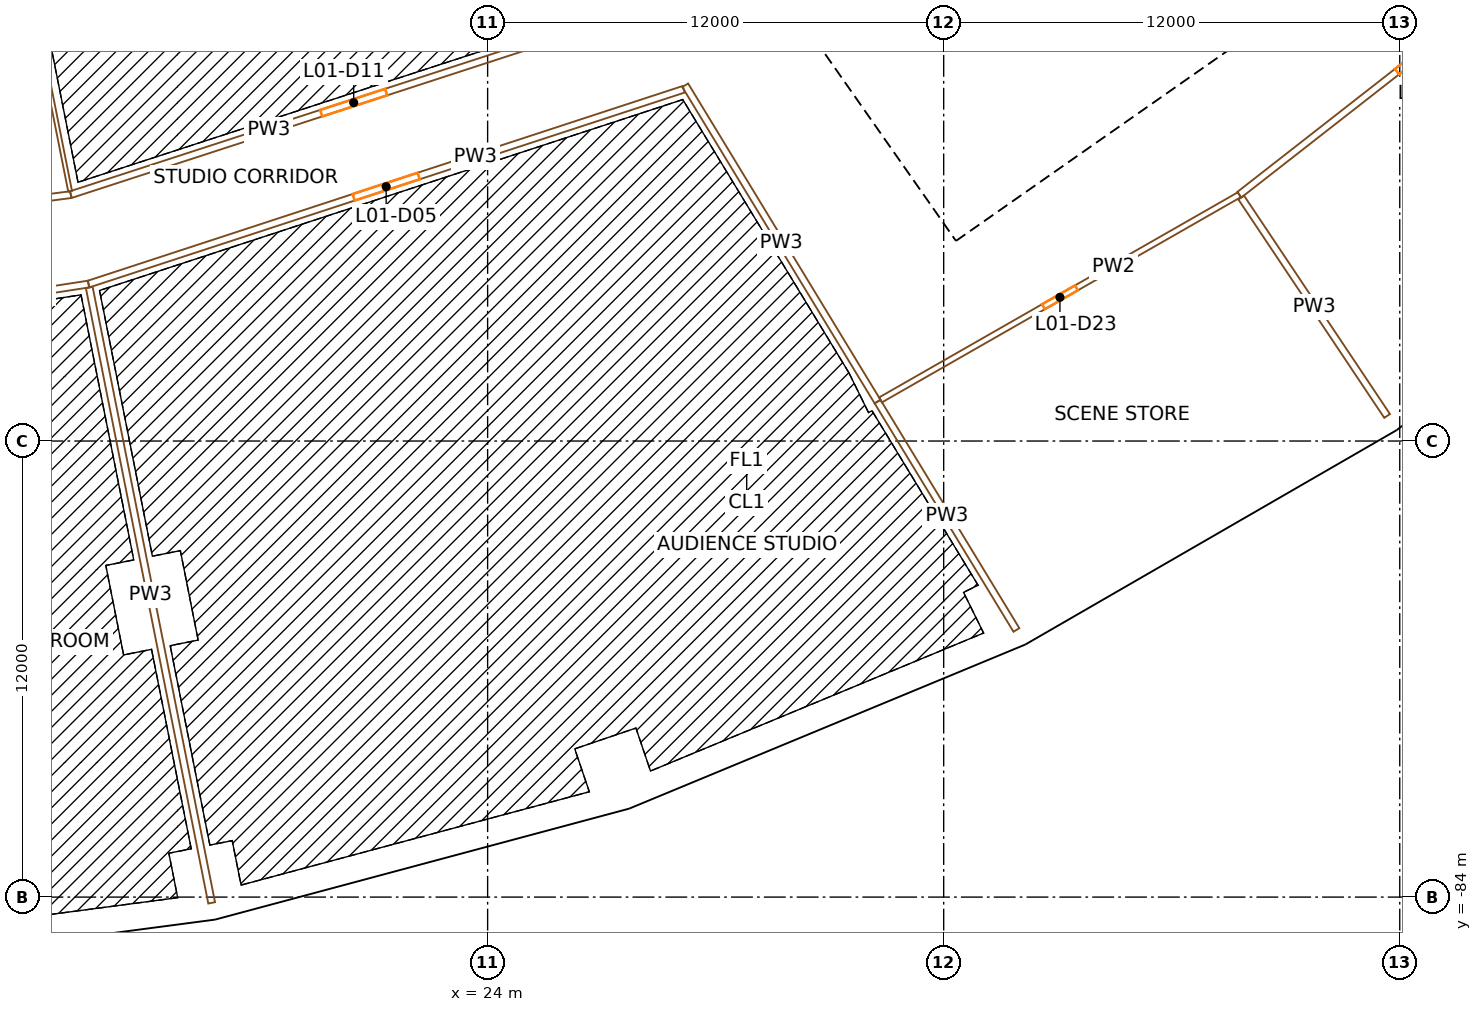
"""IFC4 building model, lengths in metres.
Left out: names, types, materials, properties, quantities, classifications, styles, units other than length and angle.
Written with IfcOpenShell. Run it as: python <this file> out.ifc"""

import sys

from ifc_helpers import new_model, si_unit, direction, frame, frame_2d, origin, origin_2d, place, context, subcontext, project, spatial, rectangle, extrude, element, fill, save


model = new_model("IFC4")
c1 = context("Model", 3, precision=1e-05, world=origin(), true_north=direction((0.0, 1.0)))
c2 = subcontext(c1, "Body", "Model", "MODEL_VIEW")
j1 = project(units=[si_unit("LENGTHUNIT", "METRE"), si_unit("PLANEANGLEUNIT", "RADIAN")], contexts=[c1])
p1 = place(None, origin())
s1 = spatial("IfcSite", under=j1, at=p1, CompositionType="ELEMENT")
p2 = place(p1, origin())
s2 = spatial("IfcBuilding", under=s1, at=p2, CompositionType="ELEMENT")
p3 = place(p2, frame((0.0, 0.0, 9.0)))
s3 = spatial("IfcBuildingStorey", under=s2, at=p3, CompositionType="ELEMENT", Elevation=9.0)
p4 = place(p3, frame((15.168, -76.256, 0.0), z_axis=(0.0, 0.0, 1.0), x_axis=(0.980785280403, 0.195090322016, 0.0)))
e1 = element("IfcColumn", 1, at=p4, inside=s3, PredefinedType="COLUMN", context=c2, shape_type="SweptSolid", body=[
    extrude(rectangle(XDim=1.4, YDim=1.8, at=origin_2d()), origin(), (0.0, 0.0, 1.0), 9.0),
])
p5 = place(p3, frame((16.631, -83.612, 0.0), z_axis=(0.0, 0.0, 1.0), x_axis=(0.980785280403, 0.195090322016, 0.0)))
e2 = element("IfcColumn", 2, at=p5, inside=s3, PredefinedType="COLUMN", context=c2, shape_type="SweptSolid", body=[
    extrude(rectangle(XDim=1.1, YDim=1.3, at=origin_2d()), origin(), (0.0, 0.0, 1.0), 9.0),
])
p6 = place(p3, frame((24.992, -73.624, 0.0), z_axis=(0.0, 0.0, 1.0), x_axis=(0.946930129495, 0.321439465303, 0.0)))
e3 = element("IfcColumn", 3, at=p6, inside=s3, PredefinedType="COLUMN", context=c2, shape_type="SweptSolid", body=[
    extrude(rectangle(XDim=1.4, YDim=1.8, at=origin_2d()), origin(), (0.0, 0.0, 1.0), 9.0),
])
p7 = place(p3, frame((27.403, -80.726, 0.0), z_axis=(0.0, 0.0, 1.0), x_axis=(0.946930129495, 0.321439465303, 0.0)))
e4 = element("IfcColumn", 4, at=p7, inside=s3, PredefinedType="COLUMN", context=c2, shape_type="SweptSolid", body=[
    extrude(rectangle(XDim=1.1, YDim=1.3, at=origin_2d()), origin(), (0.0, 0.0, 1.0), 9.0),
])
p8 = place(p3, frame((34.388, -69.732, 0.0), z_axis=(0.0, 0.0, 1.0), x_axis=(0.896872741533, 0.442288690219, 0.0)))
e5 = element("IfcColumn", 5, at=p8, inside=s3, PredefinedType="COLUMN", context=c2, shape_type="SweptSolid", body=[
    extrude(rectangle(XDim=1.4, YDim=1.8, at=origin_2d()), origin(), (0.0, 0.0, 1.0), 9.0),
])
p9 = place(p3, frame((37.705, -76.458, 0.0), z_axis=(0.0, 0.0, 1.0), x_axis=(0.896872741533, 0.442288690219, 0.0)))
e6 = element("IfcColumn", 6, at=p9, inside=s3, PredefinedType="COLUMN", context=c2, shape_type="SweptSolid", body=[
    extrude(rectangle(XDim=1.1, YDim=1.3, at=origin_2d()), origin(), (0.0, 0.0, 1.0), 9.0),
])
p10 = place(p3, frame((43.196, -64.647, 0.0), z_axis=(0.0, 0.0, 1.0), x_axis=(0.831469612303, 0.55557023302, 0.0)))
e7 = element("IfcColumn", 7, at=p10, inside=s3, PredefinedType="COLUMN", context=c2, shape_type="SweptSolid", body=[
    extrude(rectangle(XDim=1.4, YDim=1.8, at=origin_2d()), origin(), (0.0, 0.0, 1.0), 9.0),
])
p11 = place(p3, frame((47.362, -70.883, 0.0), z_axis=(0.0, 0.0, 1.0), x_axis=(0.831469612303, 0.55557023302, 0.0)))
e8 = element("IfcColumn", 8, at=p11, inside=s3, PredefinedType="COLUMN", context=c2, shape_type="SweptSolid", body=[
    extrude(rectangle(XDim=1.1, YDim=1.3, at=origin_2d()), origin(), (0.0, 0.0, 1.0), 9.0),
])
p12 = place(p3, frame((36.717, -66.337, 0.0), z_axis=(0.0, 0.0, 1.0), x_axis=(-0.573577477574, 0.819151315216, 0.0)))
e9 = element("IfcWall", 9, at=p12, inside=s3, PredefinedType="SHEAR", context=c2, shape_type="SweptSolid", body=[
    extrude(rectangle(XDim=14.8, YDim=0.9, at=frame_2d((7.4, 0.0))), origin(), (0.0, 0.0, 1.0), 8.6),
])
p13 = place(p12, frame((6.2, 0.0, 0.0)))
e10 = element("IfcOpeningElement", 10, at=p13, cuts=e9, PredefinedType="OPENING", context=c2, shape_type="SweptSolid", body=[
    extrude(rectangle(XDim=2.4, YDim=2.1, at=frame_2d((1.2, 1.05))), frame((0.0, 0.46, 0.0), z_axis=(0.0, -1.0, 0.0), x_axis=(1.0, 0.0, 0.0)), (0.0, 0.0, 1.0), 0.92),
])
p14 = place(p3, frame((36.827, -65.71, 0.0), z_axis=(0.0, 0.0, 1.0), x_axis=(0.819153391756, 0.573574511963, 0.0)))
e11 = element("IfcWall", 11, at=p14, inside=s3, PredefinedType="SHEAR", context=c2, shape_type="SweptSolid", body=[
    extrude(rectangle(XDim=15.045, YDim=0.9, at=frame_2d((7.523, 0.0))), origin(), (0.0, 0.0, 1.0), 8.6),
])
p15 = place(p14, frame((0.8, 0.0, 0.0)))
e12 = element("IfcOpeningElement", 12, at=p15, cuts=e11, PredefinedType="OPENING", context=c2, shape_type="SweptSolid", body=[
    extrude(rectangle(XDim=1.0, YDim=2.1, at=frame_2d((0.5, 1.05))), frame((0.0, 0.46, 0.0), z_axis=(0.0, -1.0, 0.0), x_axis=(1.0, 0.0, 0.0)), (0.0, 0.0, 1.0), 0.92),
])
p16 = place(p14, frame((3.475, 0.0, 0.0)))
e13 = element("IfcOpeningElement", 13, at=p16, cuts=e11, PredefinedType="OPENING", context=c2, shape_type="SweptSolid", body=[
    extrude(rectangle(XDim=1.0, YDim=2.1, at=frame_2d((0.5, 1.05))), frame((0.0, 0.46, 0.0), z_axis=(0.0, -1.0, 0.0), x_axis=(1.0, 0.0, 0.0)), (0.0, 0.0, 1.0), 0.92),
])
p17 = place(p14, frame((6.175, 0.0, 0.0)))
e14 = element("IfcOpeningElement", 14, at=p17, cuts=e11, PredefinedType="OPENING", context=c2, shape_type="SweptSolid", body=[
    extrude(rectangle(XDim=1.0, YDim=2.1, at=frame_2d((0.5, 1.05))), frame((0.0, 0.46, 0.0), z_axis=(0.0, -1.0, 0.0), x_axis=(1.0, 0.0, 0.0)), (0.0, 0.0, 1.0), 0.92),
])
p18 = place(p14, frame((13.495, 0.0, 0.0)))
e15 = element("IfcOpeningElement", 15, at=p18, cuts=e11, PredefinedType="OPENING", context=c2, shape_type="SweptSolid", body=[
    extrude(rectangle(XDim=1.1, YDim=2.1, at=frame_2d((0.55, 1.05))), frame((0.0, 0.46, 0.0), z_axis=(0.0, -1.0, 0.0), x_axis=(1.0, 0.0, 0.0)), (0.0, 0.0, 1.0), 0.92),
])
p19 = place(p3, frame((35.221, -63.417, 0.0), z_axis=(0.0, 0.0, 1.0), x_axis=(0.819166993208, 0.573555086491, 0.0)))
e16 = element("IfcWall", 16, at=p19, inside=s3, PredefinedType="SOLIDWALL", context=c2, shape_type="SweptSolid", body=[
    extrude(rectangle(XDim=7.95, YDim=0.3, at=frame_2d((3.975, 0.0))), origin(), (0.0, 0.0, 1.0), 8.6),
])
p20 = place(p3, frame((35.512, -60.344, 0.0), z_axis=(0.0, 0.0, 1.0), x_axis=(0.573633636671, -0.819111989218, 0.0)))
e17 = element("IfcWall", 17, at=p20, inside=s3, PredefinedType="PARTITIONING", context=c2, shape_type="SweptSolid", body=[
    extrude(rectangle(XDim=2.2, YDim=0.15, at=frame_2d((1.1, 0.0))), origin(), (0.0, 0.0, 1.0), 8.6),
])
p21 = place(p3, frame((37.478, -62.02, 0.0), z_axis=(0.0, 0.0, 1.0), x_axis=(0.573581496053, -0.819148501424, 0.0)))
e18 = element("IfcWall", 18, at=p21, inside=s3, PredefinedType="PLUMBINGWALL", context=c2, shape_type="SweptSolid", body=[
    extrude(rectangle(XDim=2.2, YDim=0.1, at=frame_2d((1.1, 0.0))), origin(), (0.0, 0.0, 1.0), 8.6),
])
p22 = place(p3, frame((39.649, -60.5, 0.0), z_axis=(0.0, 0.0, 1.0), x_axis=(0.573507030513, -0.819200638399, 0.0)))
e19 = element("IfcWall", 19, at=p22, inside=s3, PredefinedType="PLUMBINGWALL", context=c2, shape_type="SweptSolid", body=[
    extrude(rectangle(XDim=2.2, YDim=0.1, at=frame_2d((1.1, 0.0))), origin(), (0.0, 0.0, 1.0), 8.6),
])
p23 = place(p3, frame((5.685, -85.833, 0.0), z_axis=(0.0, 0.0, 1.0), x_axis=(0.991447502826, 0.130506126829, 0.0)))
e20 = element("IfcWall", 20, at=p23, inside=s3, PredefinedType="SOLIDWALL", context=c2, shape_type="SweptSolid", body=[
    extrude(rectangle(XDim=11.135, YDim=0.45, at=frame_2d((5.567, 0.0))), origin(), (0.0, 0.0, 1.0), 7.7),
])
p24 = place(p3, frame((16.754, -84.379, 0.0), z_axis=(0.0, 0.0, 1.0), x_axis=(0.965923678926, 0.258827059038, 0.0)))
e21 = element("IfcWall", 21, at=p24, inside=s3, PredefinedType="SOLIDWALL", context=c2, shape_type="SweptSolid", body=[
    extrude(rectangle(XDim=11.312, YDim=0.45, at=frame_2d((5.656, 0.0))), origin(), (0.0, 0.0, 1.0), 7.7),
])
p25 = place(p3, frame((27.706, -81.437, 0.0), z_axis=(0.0, 0.0, 1.0), x_axis=(0.923874126662, 0.382696482978, 0.0)))
e22 = element("IfcWall", 22, at=p25, inside=s3, PredefinedType="SOLIDWALL", context=c2, shape_type="SweptSolid", body=[
    extrude(rectangle(XDim=11.135, YDim=0.45, at=frame_2d((5.567, 0.0))), origin(), (0.0, 0.0, 1.0), 7.7),
])
p26 = place(p3, frame((38.022, -77.168, 0.0), z_axis=(0.0, 0.0, 1.0), x_axis=(0.866024577697, 0.500001430823, 0.0)))
e23 = element("IfcWall", 23, at=p26, inside=s3, PredefinedType="SOLIDWALL", context=c2, shape_type="SweptSolid", body=[
    extrude(rectangle(XDim=11.312, YDim=0.45, at=frame_2d((5.656, 0.0))), origin(), (0.0, 0.0, 1.0), 7.7),
])
p27 = place(p3, frame((47.839, -71.491, 0.0), z_axis=(0.0, 0.0, 1.0), x_axis=(0.793355377778, 0.608758773695, 0.0)))
e24 = element("IfcWall", 24, at=p27, inside=s3, PredefinedType="SOLIDWALL", context=c2, shape_type="SweptSolid", body=[
    extrude(rectangle(XDim=11.135, YDim=0.45, at=frame_2d((5.567, 0.0))), origin(), (0.0, 0.0, 1.0), 7.7),
])
p28 = place(p3, frame((4.369, -66.657, 0.0), z_axis=(0.0, 0.0, 1.0), x_axis=(0.991443260322, 0.130538352841, 0.0)))
e25 = element("IfcWall", 25, at=p28, inside=s3, PredefinedType="PARTITIONING", context=c2, shape_type="SweptSolid", body=[
    extrude(rectangle(XDim=8.738, YDim=0.18, at=frame_2d((4.369, 0.0))), origin(), (0.0, 0.0, 1.0), 7.6),
])
p29 = place(p28, frame((3.869, 0.0, 0.0)))
e26 = element("IfcOpeningElement", 26, at=p29, cuts=e25, PredefinedType="OPENING", context=c2, shape_type="SweptSolid", body=[
    extrude(rectangle(XDim=1.0, YDim=2.1, at=frame_2d((0.5, 1.05))), frame((0.0, 0.1, 0.0), z_axis=(0.0, -1.0, 0.0), x_axis=(1.0, 0.0, 0.0)), (0.0, 0.0, 1.0), 0.2),
])
p30 = place(p3, frame((13.5, -67.87, 0.0), z_axis=(0.0, 0.0, 1.0), x_axis=(-0.98836608834, -0.152093640297, 0.0)))
e27 = element("IfcWall", 27, at=p30, inside=s3, PredefinedType="PARTITIONING", context=c2, shape_type="SweptSolid", body=[
    extrude(rectangle(XDim=6.039, YDim=0.18, at=frame_2d((3.02, 0.0))), origin(), (0.0, 0.0, 1.0), 7.6),
])
p31 = place(p30, frame((2.52, 0.0, 0.0)))
e28 = element("IfcOpeningElement", 28, at=p31, cuts=e27, PredefinedType="OPENING", context=c2, shape_type="SweptSolid", body=[
    extrude(rectangle(XDim=1.0, YDim=2.1, at=frame_2d((0.5, 1.05))), frame((0.0, 0.1, 0.0), z_axis=(0.0, -1.0, 0.0), x_axis=(1.0, 0.0, 0.0)), (0.0, 0.0, 1.0), 0.2),
])
p32 = place(p3, frame((9.793, -49.235, 0.0), z_axis=(0.0, 0.0, 1.0), x_axis=(0.195089444663, -0.980785454919, 0.0)))
e29 = element("IfcWall", 29, at=p32, inside=s3, PredefinedType="PARTITIONING", context=c2, shape_type="SweptSolid", body=[
    extrude(rectangle(XDim=16.51, YDim=0.1, at=frame_2d((8.255, 0.0))), origin(), (0.0, 0.0, 1.0), 7.6),
])
p33 = place(p3, frame((13.032, -65.516, 0.0), z_axis=(0.0, 0.0, 1.0), x_axis=(0.950996699022, 0.309201032419, 0.0)))
e30 = element("IfcWall", 30, at=p33, inside=s3, PredefinedType="PARTITIONING", context=c2, shape_type="SweptSolid", body=[
    extrude(rectangle(XDim=15.654, YDim=0.18, at=frame_2d((7.827, 0.0))), origin(), (0.0, 0.0, 1.0), 7.6),
])
p34 = place(p33, frame((6.927, 0.0, 0.0)))
e31 = element("IfcOpeningElement", 31, at=p34, cuts=e30, PredefinedType="OPENING", context=c2, shape_type="SweptSolid", body=[
    extrude(rectangle(XDim=1.8, YDim=2.1, at=frame_2d((0.9, 1.05))), frame((0.0, 0.1, 0.0), z_axis=(0.0, -1.0, 0.0), x_axis=(1.0, 0.0, 0.0)), (0.0, 0.0, 1.0), 0.2),
])
p35 = place(p3, frame((29.16, -62.744, 0.0), z_axis=(0.0, 0.0, 1.0), x_axis=(-0.95037928892, -0.31109356662, 0.0)))
e32 = element("IfcWall", 32, at=p35, inside=s3, PredefinedType="PARTITIONING", context=c2, shape_type="SweptSolid", body=[
    extrude(rectangle(XDim=16.477, YDim=0.18, at=frame_2d((8.239, 0.0))), origin(), (0.0, 0.0, 1.0), 7.6),
])
p36 = place(p35, frame((7.339, 0.0, 0.0)))
e33 = element("IfcOpeningElement", 33, at=p36, cuts=e32, PredefinedType="OPENING", context=c2, shape_type="SweptSolid", body=[
    extrude(rectangle(XDim=1.8, YDim=2.4, at=frame_2d((0.9, 1.2))), frame((0.0, 0.1, 0.0), z_axis=(0.0, -1.0, 0.0), x_axis=(1.0, 0.0, 0.0)), (0.0, 0.0, 1.0), 0.2),
])
p37 = place(p3, frame((16.739, -84.151, 0.0), z_axis=(0.0, 0.0, 1.0), x_axis=(-0.195089444663, 0.980785454919, 0.0)))
e34 = element("IfcWall", 34, at=p37, inside=s3, PredefinedType="PARTITIONING", context=c2, shape_type="SweptSolid", body=[
    extrude(rectangle(XDim=16.51, YDim=0.18, at=frame_2d((8.255, 0.0))), origin(), (0.0, 0.0, 1.0), 7.6),
])
p38 = place(p3, frame((29.199, -62.639, 0.0), z_axis=(0.0, 0.0, 1.0), x_axis=(0.519569231187, -0.854428355103, 0.0)))
e35 = element("IfcWall", 35, at=p38, inside=s3, PredefinedType="PARTITIONING", context=c2, shape_type="SweptSolid", body=[
    extrude(rectangle(XDim=9.741, YDim=0.18, at=frame_2d((4.871, 0.0))), origin(), (0.0, 0.0, 1.0), 7.6),
])
p39 = place(p3, frame((34.26, -70.963, 0.0), z_axis=(0.0, 0.0, 1.0), x_axis=(0.519582317334, -0.854420397412, 0.0)))
e36 = element("IfcWall", 36, at=p39, inside=s3, PredefinedType="PARTITIONING", context=c2, shape_type="SweptSolid", body=[
    extrude(rectangle(XDim=7.032, YDim=0.18, at=frame_2d((3.516, 0.0))), origin(), (0.0, 0.0, 1.0), 7.6),
])
p40 = place(p3, frame((43.779, -65.52, 0.0), z_axis=(0.0, 0.0, 1.0), x_axis=(-0.868109106225, -0.496373427663, 0.0)))
e37 = element("IfcWall", 37, at=p40, inside=s3, PredefinedType="PARTITIONING", context=c2, shape_type="SweptSolid", body=[
    extrude(rectangle(XDim=10.875, YDim=0.15, at=frame_2d((5.438, 0.0))), origin(), (0.0, 0.0, 1.0), 7.6),
])
p41 = place(p40, frame((4.938, 0.0, 0.0)))
e38 = element("IfcOpeningElement", 38, at=p41, cuts=e37, PredefinedType="OPENING", context=c2, shape_type="SweptSolid", body=[
    extrude(rectangle(XDim=1.0, YDim=2.1, at=frame_2d((0.5, 1.05))), frame((0.0, 0.085, 0.0), z_axis=(0.0, -1.0, 0.0), x_axis=(1.0, 0.0, 0.0)), (0.0, 0.0, 1.0), 0.17),
])
p42 = place(p3, frame((52.865, -58.427, 0.0), z_axis=(0.0, 0.0, 1.0), x_axis=(-0.788252635542, -0.615351755146, 0.0)))
e39 = element("IfcWall", 39, at=p42, inside=s3, PredefinedType="PARTITIONING", context=c2, shape_type="SweptSolid", body=[
    extrude(rectangle(XDim=11.526, YDim=0.18, at=frame_2d((5.763, 0.0))), origin(), (0.0, 0.0, 1.0), 7.6),
])
p43 = place(p42, frame((5.263, 0.0, 0.0)))
e40 = element("IfcOpeningElement", 40, at=p43, cuts=e39, PredefinedType="OPENING", context=c2, shape_type="SweptSolid", body=[
    extrude(rectangle(XDim=1.0, YDim=2.1, at=frame_2d((0.5, 1.05))), frame((0.0, 0.1, 0.0), z_axis=(0.0, -1.0, 0.0), x_axis=(1.0, 0.0, 0.0)), (0.0, 0.0, 1.0), 0.2),
])
p44 = place(p3, frame((47.668, -71.34, 0.0), z_axis=(0.0, 0.0, 1.0), x_axis=(-0.555588604147, 0.831457336814, 0.0)))
e41 = element("IfcWall", 41, at=p44, inside=s3, PredefinedType="PARTITIONING", context=c2, shape_type="SweptSolid", body=[
    extrude(rectangle(XDim=6.91, YDim=0.18, at=frame_2d((3.455, 0.0))), origin(), (0.0, 0.0, 1.0), 7.6),
])
p45 = place(p15, origin())
e42 = element("IfcDoor", 42, at=p45, inside=s3, OperationType="SINGLE_SWING_LEFT", PredefinedType="DOOR", context=c2, shape_type="SweptSolid", body=[
    extrude(rectangle(XDim=1.0, YDim=2.1, at=frame_2d((0.5, 1.05))), frame((0.0, 0.025, 0.0), z_axis=(0.0, -1.0, 0.0), x_axis=(1.0, 0.0, 0.0)), (0.0, 0.0, 1.0), 0.05),
])
fill(e12, e42)
p46 = place(p16, origin())
e43 = element("IfcDoor", 43, at=p46, inside=s3, OperationType="SINGLE_SWING_RIGHT", PredefinedType="DOOR", context=c2, shape_type="SweptSolid", body=[
    extrude(rectangle(XDim=1.0, YDim=2.1, at=frame_2d((0.5, 1.05))), frame((0.0, 0.025, 0.0), z_axis=(0.0, -1.0, 0.0), x_axis=(1.0, 0.0, 0.0)), (0.0, 0.0, 1.0), 0.05),
])
fill(e13, e43)
p47 = place(p17, origin())
e44 = element("IfcDoor", 44, at=p47, inside=s3, OperationType="SINGLE_SWING_LEFT", PredefinedType="DOOR", context=c2, shape_type="SweptSolid", body=[
    extrude(rectangle(XDim=1.0, YDim=2.1, at=frame_2d((0.5, 1.05))), frame((0.0, 0.025, 0.0), z_axis=(0.0, -1.0, 0.0), x_axis=(1.0, 0.0, 0.0)), (0.0, 0.0, 1.0), 0.05),
])
fill(e14, e44)
p48 = place(p36, origin())
e45 = element("IfcDoor", 45, at=p48, inside=s3, OperationType="DOUBLE_DOOR_SINGLE_SWING", PredefinedType="DOOR", context=c2, shape_type="SweptSolid", body=[
    extrude(rectangle(XDim=1.8, YDim=2.4, at=frame_2d((0.9, 1.2))), frame((0.0, 0.025, 0.0), z_axis=(0.0, -1.0, 0.0), x_axis=(1.0, 0.0, 0.0)), (0.0, 0.0, 1.0), 0.05),
])
fill(e33, e45)
p49 = place(p34, origin())
e46 = element("IfcDoor", 46, at=p49, inside=s3, OperationType="DOUBLE_DOOR_SINGLE_SWING", PredefinedType="DOOR", context=c2, shape_type="SweptSolid", body=[
    extrude(rectangle(XDim=1.8, YDim=2.1, at=frame_2d((0.9, 1.05))), frame((0.0, 0.025, 0.0), z_axis=(0.0, -1.0, 0.0), x_axis=(1.0, 0.0, 0.0)), (0.0, 0.0, 1.0), 0.05),
])
fill(e31, e46)
p50 = place(p41, origin())
e47 = element("IfcDoor", 47, at=p50, inside=s3, OperationType="SINGLE_SWING_RIGHT", PredefinedType="DOOR", context=c2, shape_type="SweptSolid", body=[
    extrude(rectangle(XDim=1.0, YDim=2.1, at=frame_2d((0.5, 1.05))), frame((0.0, 0.025, 0.0), z_axis=(0.0, -1.0, 0.0), x_axis=(1.0, 0.0, 0.0)), (0.0, 0.0, 1.0), 0.05),
])
fill(e38, e47)
p51 = place(p43, origin())
e48 = element("IfcDoor", 48, at=p51, inside=s3, OperationType="SINGLE_SWING_RIGHT", PredefinedType="DOOR", context=c2, shape_type="SweptSolid", body=[
    extrude(rectangle(XDim=1.0, YDim=2.1, at=frame_2d((0.5, 1.05))), frame((0.0, 0.025, 0.0), z_axis=(0.0, -1.0, 0.0), x_axis=(1.0, 0.0, 0.0)), (0.0, 0.0, 1.0), 0.05),
])
fill(e40, e48)
save(model, sys.argv[1])
